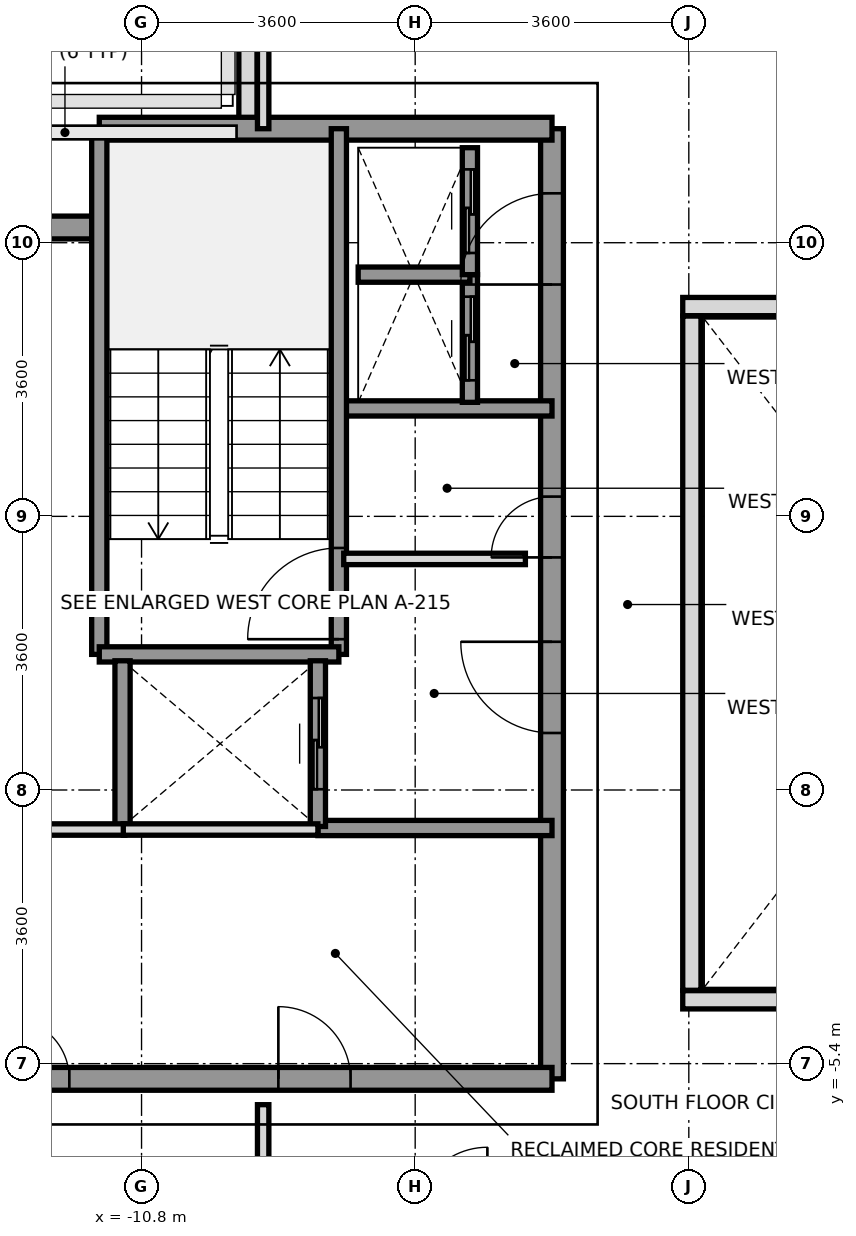
"""IFC4 building model, lengths in metres.
Left out: names, types, materials, properties, quantities, classifications, styles, units other than length and angle.
Written with IfcOpenShell. Run it as: python <this file> out.ifc"""

import sys

from ifc_helpers import new_model, si_unit, direction, frame, frame_2d, origin, place, context, subcontext, project, spatial, rectangle, extrude, source, transform, mapped, element, fill, save


model = new_model("IFC4")
c1 = context("Model", 3, precision=1e-05, world=origin(), true_north=direction((0.0, 1.0)))
c2 = subcontext(c1, "Body", "Model", "MODEL_VIEW")
j1 = project(units=[si_unit("LENGTHUNIT", "METRE"), si_unit("PLANEANGLEUNIT", "RADIAN")], contexts=[c1])
p1 = place(None, origin())
s1 = spatial("IfcSite", under=j1, at=p1, CompositionType="ELEMENT")
p2 = place(p1, origin())
s2 = spatial("IfcBuilding", under=s1, at=p2, CompositionType="ELEMENT")
p3 = place(p2, frame((0.0, 0.0, 246.0)))
s3 = spatial("IfcBuildingStorey", under=s2, at=p3, CompositionType="ELEMENT", Elevation=246.0)
p4 = place(p3, frame((-9.4, 6.953, 0.0), z_axis=(0.0, 0.0, 1.0), x_axis=(0.0, 1.0, 0.0)))
e1 = element("IfcWall", 1, at=p4, inside=s3, PredefinedType="PARAPET", context=c2, shape_type="SweptSolid", body=[
    extrude(rectangle(XDim=1.669, YDim=0.24, at=frame_2d((0.834, 0.0))), origin(), (0.0, 0.0, 1.0), 1.15),
])
p5 = place(p3, frame((-5.4, -5.6, 0.0), z_axis=(0.0, 0.0, 1.0), x_axis=(0.0, 1.0, 0.0)))
e2 = element("IfcWall", 2, at=p5, inside=s3, PredefinedType="SHEAR", context=c2, shape_type="SweptSolid", body=[
    extrude(rectangle(XDim=12.5, YDim=0.3, at=frame_2d((6.25, 0.0))), origin(), (0.0, 0.0, 1.0), 3.01),
])
p6 = place(p5, frame((4.55, 0.0, 0.0)))
e3 = element("IfcOpeningElement", 3, at=p6, cuts=e2, PredefinedType="OPENING", context=c2, shape_type="SweptSolid", body=[
    extrude(rectangle(XDim=1.2, YDim=2.2, at=frame_2d((0.6, 1.1))), frame((0.0, 0.16, 0.0), z_axis=(0.0, -1.0, 0.0), x_axis=(1.0, 0.0, 0.0)), (0.0, 0.0, 1.0), 0.32),
])
p7 = place(p5, frame((10.45, 0.0, 0.0)))
e4 = element("IfcOpeningElement", 4, at=p7, cuts=e2, PredefinedType="OPENING", context=c2, shape_type="SweptSolid", body=[
    extrude(rectangle(XDim=1.2, YDim=2.2, at=frame_2d((0.6, 1.1))), frame((0.0, 0.16, 0.0), z_axis=(0.0, -1.0, 0.0), x_axis=(1.0, 0.0, 0.0)), (0.0, 0.0, 1.0), 0.32),
])
p8 = place(p5, frame((6.86, 0.0, 0.0)))
e5 = element("IfcOpeningElement", 5, at=p8, cuts=e2, PredefinedType="OPENING", context=c2, shape_type="SweptSolid", body=[
    extrude(rectangle(XDim=0.8, YDim=2.1, at=frame_2d((0.4, 1.05))), frame((0.0, 0.16, 0.0), z_axis=(0.0, -1.0, 0.0), x_axis=(1.0, 0.0, 0.0)), (0.0, 0.0, 1.0), 0.32),
])
p9 = place(p3, frame((-11.356, 6.9, 0.0), z_axis=(0.0, 0.0, 1.0), x_axis=(1.0, 0.0, 0.0)))
e6 = element("IfcWall", 6, at=p9, inside=s3, PredefinedType="SHEAR", context=c2, shape_type="SweptSolid", body=[
    extrude(rectangle(XDim=5.956, YDim=0.3, at=frame_2d((2.978, 0.0))), origin(), (0.0, 0.0, 1.0), 3.01),
])
p10 = place(p3, frame((-13.2, 5.6, 0.0), z_axis=(0.0, 0.0, 1.0), x_axis=(1.0, 0.0, 0.0)))
e7 = element("IfcWall", 7, at=p10, inside=s3, PredefinedType="SHEAR", context=c2, shape_type="SweptSolid", body=[
    extrude(rectangle(XDim=1.844, YDim=0.3, at=frame_2d((0.922, 0.0))), origin(), (0.0, 0.0, 1.0), 3.01),
])
p11 = place(p3, frame((-13.2, -5.6, 0.0), z_axis=(0.0, 0.0, 1.0), x_axis=(1.0, 0.0, 0.0)))
e8 = element("IfcWall", 8, at=p11, inside=s3, PredefinedType="SHEAR", context=c2, shape_type="SweptSolid", body=[
    extrude(rectangle(XDim=7.8, YDim=0.3, at=frame_2d((3.9, 0.0))), origin(), (0.0, 0.0, 1.0), 3.01),
])
p12 = place(p11, frame((0.65, 0.0, 0.0)))
e9 = element("IfcOpeningElement", 9, at=p12, cuts=e8, PredefinedType="OPENING", context=c2, shape_type="SweptSolid", body=[
    extrude(rectangle(XDim=0.8, YDim=2.1, at=frame_2d((0.4, 1.05))), frame((0.0, 0.16, 0.0), z_axis=(0.0, -1.0, 0.0), x_axis=(1.0, 0.0, 0.0)), (0.0, 0.0, 1.0), 0.32),
])
p13 = place(p11, frame((4.2, 0.0, 0.0)))
e10 = element("IfcOpeningElement", 10, at=p13, cuts=e8, PredefinedType="OPENING", context=c2, shape_type="SweptSolid", body=[
    extrude(rectangle(XDim=0.95, YDim=2.15, at=frame_2d((0.475, 1.075))), frame((0.0, 0.16, 0.0), z_axis=(0.0, -1.0, 0.0), x_axis=(1.0, 0.0, 0.0)), (0.0, 0.0, 1.0), 0.32),
])
p14 = place(p3, frame((-8.18, 3.22, 0.0), z_axis=(0.0, 0.0, 1.0), x_axis=(1.0, 0.0, 0.0)))
e11 = element("IfcWall", 11, at=p14, inside=s3, PredefinedType="SOLIDWALL", context=c2, shape_type="SweptSolid", body=[
    extrude(rectangle(XDim=2.78, YDim=0.2, at=frame_2d((1.39, 0.0))), origin(), (0.0, 0.0, 1.0), 3.01),
])
p15 = place(p3, frame((-8.48, -2.3, 0.0), z_axis=(0.0, 0.0, 1.0), x_axis=(1.0, 0.0, 0.0)))
e12 = element("IfcWall", 12, at=p15, inside=s3, PredefinedType="SOLIDWALL", context=c2, shape_type="SweptSolid", body=[
    extrude(rectangle(XDim=3.08, YDim=0.2, at=frame_2d((1.54, 0.0))), origin(), (0.0, 0.0, 1.0), 3.01),
])
p16 = place(p3, frame((-8.204, -0.016, 0.0), z_axis=(0.0, 0.0, 1.0), x_axis=(0.0, 1.0, 0.0)))
e13 = element("IfcWall", 13, at=p16, inside=s3, PredefinedType="SOLIDWALL", context=c2, shape_type="SweptSolid", body=[
    extrude(rectangle(XDim=6.916, YDim=0.2, at=frame_2d((3.458, 0.0))), origin(), (0.0, 0.0, 1.0), 3.01),
])
p17 = place(p16, frame((0.2, 0.0, 0.0)))
e14 = element("IfcOpeningElement", 14, at=p17, cuts=e13, PredefinedType="OPENING", context=c2, shape_type="SweptSolid", body=[
    extrude(rectangle(XDim=1.2, YDim=2.2, at=frame_2d((0.6, 1.1))), frame((0.0, 0.11, 0.0), z_axis=(0.0, -1.0, 0.0), x_axis=(1.0, 0.0, 0.0)), (0.0, 0.0, 1.0), 0.22),
])
p18 = place(p3, frame((-11.356, -0.016, 0.0), z_axis=(0.0, 0.0, 1.0), x_axis=(0.0, 1.0, 0.0)))
e15 = element("IfcWall", 15, at=p18, inside=s3, PredefinedType="SOLIDWALL", context=c2, shape_type="SweptSolid", body=[
    extrude(rectangle(XDim=6.916, YDim=0.2, at=frame_2d((3.458, 0.0))), origin(), (0.0, 0.0, 1.0), 3.01),
])
p19 = place(p3, frame((-11.356, -0.016, 0.0), z_axis=(0.0, 0.0, 1.0), x_axis=(1.0, 0.0, 0.0)))
e16 = element("IfcWall", 16, at=p19, inside=s3, PredefinedType="SOLIDWALL", context=c2, shape_type="SweptSolid", body=[
    extrude(rectangle(XDim=3.152, YDim=0.2, at=frame_2d((1.576, 0.0))), origin(), (0.0, 0.0, 1.0), 3.01),
])
p20 = place(p3, frame((-11.05, -2.28, 0.0), z_axis=(0.0, 0.0, 1.0), x_axis=(0.0, 1.0, 0.0)))
e17 = element("IfcWall", 17, at=p20, inside=s3, PredefinedType="SOLIDWALL", context=c2, shape_type="SweptSolid", body=[
    extrude(rectangle(XDim=2.18, YDim=0.2, at=frame_2d((1.09, 0.0))), origin(), (0.0, 0.0, 1.0), 3.01),
])
p21 = place(p3, frame((-8.48, -2.28, 0.0), z_axis=(0.0, 0.0, 1.0), x_axis=(0.0, 1.0, 0.0)))
e18 = element("IfcWall", 18, at=p21, inside=s3, PredefinedType="SOLIDWALL", context=c2, shape_type="SweptSolid", body=[
    extrude(rectangle(XDim=2.18, YDim=0.2, at=frame_2d((1.09, 0.0))), origin(), (0.0, 0.0, 1.0), 3.01),
])
p22 = place(p21, frame((0.49, 0.0, 0.0)))
e19 = element("IfcOpeningElement", 19, at=p22, cuts=e18, PredefinedType="OPENING", context=c2, shape_type="SweptSolid", body=[
    extrude(rectangle(XDim=1.2, YDim=2.2, at=frame_2d((0.6, 1.1))), frame((0.0, 0.11, 0.0), z_axis=(0.0, -1.0, 0.0), x_axis=(1.0, 0.0, 0.0)), (0.0, 0.0, 1.0), 0.22),
])
p23 = place(p3, frame((-6.48, 3.3, 0.0), z_axis=(0.0, 0.0, 1.0), x_axis=(0.0, 1.0, 0.0)))
e20 = element("IfcWall", 20, at=p23, inside=s3, PredefinedType="SOLIDWALL", context=c2, shape_type="SweptSolid", body=[
    extrude(rectangle(XDim=1.68, YDim=0.2, at=frame_2d((0.84, 0.0))), origin(), (0.0, 0.0, 1.0), 3.01),
])
p24 = place(p23, frame((0.29, 0.0, 0.0)))
e21 = element("IfcOpeningElement", 21, at=p24, cuts=e20, PredefinedType="OPENING", context=c2, shape_type="SweptSolid", body=[
    extrude(rectangle(XDim=1.1, YDim=2.2, at=frame_2d((0.55, 1.1))), frame((0.0, 0.11, 0.0), z_axis=(0.0, -1.0, 0.0), x_axis=(1.0, 0.0, 0.0)), (0.0, 0.0, 1.0), 0.22),
])
p25 = place(p3, frame((-7.95, 4.98, 0.0), z_axis=(0.0, 0.0, 1.0), x_axis=(1.0, 0.0, 0.0)))
e22 = element("IfcWall", 22, at=p25, inside=s3, PredefinedType="SOLIDWALL", context=c2, shape_type="SweptSolid", body=[
    extrude(rectangle(XDim=1.47, YDim=0.2, at=frame_2d((0.735, 0.0))), origin(), (0.0, 0.0, 1.0), 3.01),
])
p26 = place(p3, frame((-6.48, 4.98, 0.0), z_axis=(0.0, 0.0, 1.0), x_axis=(0.0, 1.0, 0.0)))
e23 = element("IfcWall", 23, at=p26, inside=s3, PredefinedType="SOLIDWALL", context=c2, shape_type="SweptSolid", body=[
    extrude(rectangle(XDim=1.67, YDim=0.2, at=frame_2d((0.835, 0.0))), origin(), (0.0, 0.0, 1.0), 3.01),
])
p27 = place(p26, frame((0.285, 0.0, 0.0)))
e24 = element("IfcOpeningElement", 24, at=p27, cuts=e23, PredefinedType="OPENING", context=c2, shape_type="SweptSolid", body=[
    extrude(rectangle(XDim=1.1, YDim=2.2, at=frame_2d((0.55, 1.1))), frame((0.0, 0.11, 0.0), z_axis=(0.0, -1.0, 0.0), x_axis=(1.0, 0.0, 0.0)), (0.0, 0.0, 1.0), 0.22),
])
p28 = place(p3, frame((-8.14, 1.24, 0.0), z_axis=(0.0, 0.0, 1.0), x_axis=(1.0, 0.0, 0.0)))
e25 = element("IfcWall", 25, at=p28, inside=s3, PredefinedType="PARTITIONING", context=c2, shape_type="SweptSolid", body=[
    extrude(rectangle(XDim=2.39, YDim=0.15, at=frame_2d((1.195, 0.0))), origin(), (0.0, 0.0, 1.0), 3.01),
])
p29 = place(p3, frame((-13.2, -2.32, 0.0), z_axis=(0.0, 0.0, 1.0), x_axis=(1.0, 0.0, 0.0)))
e26 = element("IfcWall", 26, at=p29, inside=s3, PredefinedType="PARTITIONING", context=c2, shape_type="SweptSolid", body=[
    extrude(rectangle(XDim=2.18, YDim=0.15, at=frame_2d((1.09, 0.0))), origin(), (0.0, 0.0, 1.0), 3.01),
])
p30 = place(p3, frame((-11.04, -2.32, 0.0), z_axis=(0.0, 0.0, 1.0), x_axis=(1.0, 0.0, 0.0)))
e27 = element("IfcWall", 27, at=p30, inside=s3, PredefinedType="PARTITIONING", context=c2, shape_type="SweptSolid", body=[
    extrude(rectangle(XDim=2.56, YDim=0.15, at=frame_2d((1.28, 0.0))), origin(), (0.0, 0.0, 1.0), 3.01),
])
p31 = place(p3, frame((-9.2, 6.9, 0.0), z_axis=(0.0, 0.0, 1.0), x_axis=(0.0, 1.0, 0.0)))
e28 = element("IfcWall", 28, at=p31, inside=s3, PredefinedType="PARTITIONING", context=c2, shape_type="SweptSolid", body=[
    extrude(rectangle(XDim=3.38, YDim=0.15, at=frame_2d((1.69, 0.0))), origin(), (0.0, 0.0, 1.0), 2.61),
])
p32 = place(p3, frame((-9.2, -10.28, 0.0), z_axis=(0.0, 0.0, 1.0), x_axis=(0.0, 1.0, 0.0)))
e29 = element("IfcWall", 29, at=p32, inside=s3, PredefinedType="PARTITIONING", context=c2, shape_type="SweptSolid", body=[
    extrude(rectangle(XDim=4.34, YDim=0.15, at=frame_2d((2.17, 0.0))), origin(), (0.0, 0.0, 1.0), 2.61),
])
for number, where, z_axis, x_axis in (
    (30, (-3.68, -4.56, 0.0), (0.0, 0.0, 1.0), (1.0, 0.0, 0.0)),
    (31, (-3.68, 4.56, 0.0), (0.0, 0.0, 1.0), (1.0, 0.0, 0.0)),
):
    element("IfcWall", number, at=place(p3, frame(where, z_axis=z_axis, x_axis=x_axis)), inside=s3, PredefinedType="PARAPET", context=c2, shape_type="SweptSolid", body=[
        extrude(rectangle(XDim=7.36, YDim=0.24, at=frame_2d((3.68, 0.0))), origin(), (0.0, 0.0, 1.0), 1.15),
    ])
p33 = place(p3, frame((-3.56, -4.435, 0.0), z_axis=(0.0, 0.0, 1.0), x_axis=(0.0, 1.0, 0.0)))
e32 = element("IfcWall", 32, at=p33, inside=s3, PredefinedType="PARAPET", context=c2, shape_type="SweptSolid", body=[
    extrude(rectangle(XDim=8.87, YDim=0.24, at=frame_2d((4.435, 0.0))), origin(), (0.0, 0.0, 1.0), 1.15),
])
m1 = source(origin(), c2, "Body", "SweptSolid", [
    extrude(rectangle(XDim=1.2, YDim=2.2, at=frame_2d((0.6, 1.1))), frame((0.0, 0.025, 0.0), z_axis=(0.0, -1.0, 0.0), x_axis=(1.0, 0.0, 0.0)), (0.0, 0.0, 1.0), 0.05),
])
p34 = place(p17, origin())
e33 = element("IfcDoor", 33, at=p34, inside=s3, OperationType="SINGLE_SWING_LEFT", PredefinedType="DOOR", context=c2, shape_type="MappedRepresentation", body=[
    mapped(m1, transform((0.0, 0.0, 0.0), x_axis=(1.0, 0.0, 0.0), y_axis=(0.0, 1.0, 0.0), z_axis=(0.0, 0.0, 1.0), scale=1.0)),
])
fill(e14, e33)
p35 = place(p6, origin())
e34 = element("IfcDoor", 34, at=p35, inside=s3, OperationType="SINGLE_SWING_RIGHT", PredefinedType="DOOR", context=c2, shape_type="MappedRepresentation", body=[
    mapped(m1, transform((0.0, 0.0, 0.0), x_axis=(1.0, 0.0, 0.0), y_axis=(0.0, 1.0, 0.0), z_axis=(0.0, 0.0, 1.0), scale=1.0)),
])
fill(e3, e34)
p36 = place(p7, origin())
e35 = element("IfcDoor", 35, at=p36, inside=s3, OperationType="SINGLE_SWING_LEFT", PredefinedType="DOOR", context=c2, shape_type="MappedRepresentation", body=[
    mapped(m1, transform((0.0, 0.0, 0.0), x_axis=(1.0, 0.0, 0.0), y_axis=(0.0, 1.0, 0.0), z_axis=(0.0, 0.0, 1.0), scale=1.0)),
])
fill(e4, e35)
m2 = source(origin(), c2, "Body", "SweptSolid", [
    extrude(rectangle(XDim=0.8, YDim=2.1, at=frame_2d((0.4, 1.05))), frame((0.0, 0.025, 0.0), z_axis=(0.0, -1.0, 0.0), x_axis=(1.0, 0.0, 0.0)), (0.0, 0.0, 1.0), 0.05),
])
p37 = place(p8, origin())
e36 = element("IfcDoor", 36, at=p37, inside=s3, OperationType="SINGLE_SWING_LEFT", PredefinedType="DOOR", context=c2, shape_type="MappedRepresentation", body=[
    mapped(m2, transform((0.0, 0.0, 0.0), x_axis=(1.0, 0.0, 0.0), y_axis=(0.0, 1.0, 0.0), z_axis=(0.0, 0.0, 1.0), scale=1.0)),
])
fill(e5, e36)
p38 = place(p12, origin())
e37 = element("IfcDoor", 37, at=p38, inside=s3, OperationType="SINGLE_SWING_LEFT", PredefinedType="DOOR", context=c2, shape_type="MappedRepresentation", body=[
    mapped(m2, transform((0.0, 0.0, 0.0), x_axis=(1.0, 0.0, 0.0), y_axis=(0.0, 1.0, 0.0), z_axis=(0.0, 0.0, 1.0), scale=1.0)),
])
fill(e9, e37)
m3 = source(origin(), c2, "Body", "SweptSolid", [
    extrude(rectangle(XDim=0.95, YDim=2.15, at=frame_2d((0.475, 1.075))), frame((0.0, 0.025, 0.0), z_axis=(0.0, -1.0, 0.0), x_axis=(1.0, 0.0, 0.0)), (0.0, 0.0, 1.0), 0.05),
])
p39 = place(p13, origin())
e38 = element("IfcDoor", 38, at=p39, inside=s3, OperationType="SINGLE_SWING_LEFT", PredefinedType="DOOR", context=c2, shape_type="MappedRepresentation", body=[
    mapped(m3, transform((0.0, 0.0, 0.0), x_axis=(1.0, 0.0, 0.0), y_axis=(0.0, 1.0, 0.0), z_axis=(0.0, 0.0, 1.0), scale=1.0)),
])
fill(e10, e38)
p40 = place(p22, origin())
e39 = element("IfcDoor", 39, at=p40, inside=s3, OperationType="SLIDING_TO_RIGHT", PredefinedType="DOOR", context=c2, shape_type="MappedRepresentation", body=[
    mapped(m1, transform((0.0, 0.0, 0.0), x_axis=(1.0, 0.0, 0.0), y_axis=(0.0, 1.0, 0.0), z_axis=(0.0, 0.0, 1.0), scale=1.0)),
])
fill(e19, e39)
m4 = source(origin(), c2, "Body", "SweptSolid", [
    extrude(rectangle(XDim=1.1, YDim=2.2, at=frame_2d((0.55, 1.1))), frame((0.0, 0.025, 0.0), z_axis=(0.0, -1.0, 0.0), x_axis=(1.0, 0.0, 0.0)), (0.0, 0.0, 1.0), 0.05),
])
p41 = place(p24, origin())
e40 = element("IfcDoor", 40, at=p41, inside=s3, OperationType="SLIDING_TO_LEFT", PredefinedType="DOOR", context=c2, shape_type="MappedRepresentation", body=[
    mapped(m4, transform((0.0, 0.0, 0.0), x_axis=(1.0, 0.0, 0.0), y_axis=(0.0, 1.0, 0.0), z_axis=(0.0, 0.0, 1.0), scale=1.0)),
])
fill(e21, e40)
p42 = place(p27, origin())
e41 = element("IfcDoor", 41, at=p42, inside=s3, OperationType="SLIDING_TO_LEFT", PredefinedType="DOOR", context=c2, shape_type="MappedRepresentation", body=[
    mapped(m4, transform((0.0, 0.0, 0.0), x_axis=(1.0, 0.0, 0.0), y_axis=(0.0, 1.0, 0.0), z_axis=(0.0, 0.0, 1.0), scale=1.0)),
])
fill(e24, e41)
save(model, sys.argv[1])
